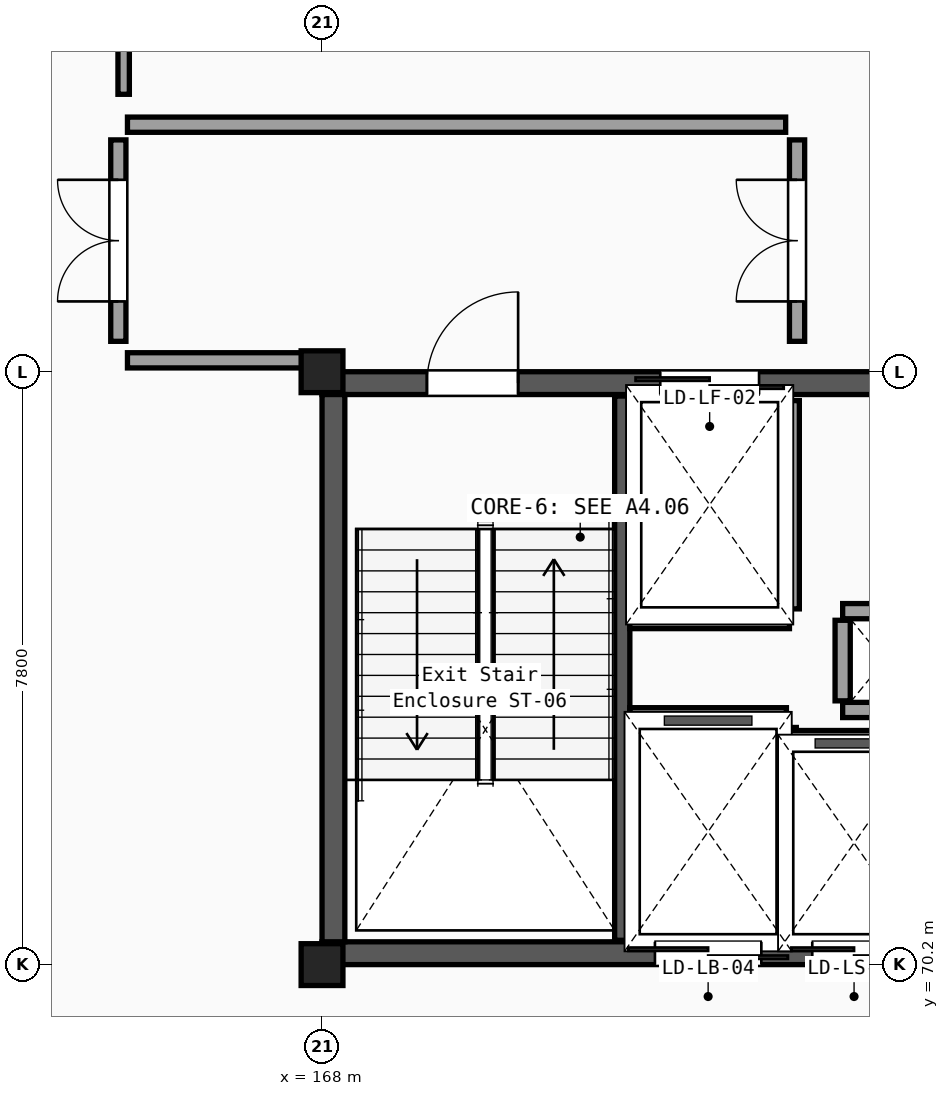
"""IFC4 building model, lengths in metres.
Left out: names, types, materials, properties, quantities, classifications, styles, units other than length and angle.
Written with IfcOpenShell. Run it as: python <this file> out.ifc"""

import sys

from ifc_helpers import new_model, si_unit, direction, frame, frame_2d, origin, origin_2d, place, context, subcontext, project, spatial, rectangle, i_section, extrude, element, fill, save


model = new_model("IFC4")
c1 = context("Model", 3, precision=1e-05, world=origin(), true_north=direction((0.0, 1.0)))
c2 = subcontext(c1, "Body", "Model", "MODEL_VIEW")
j1 = project(units=[si_unit("LENGTHUNIT", "METRE"), si_unit("PLANEANGLEUNIT", "RADIAN")], contexts=[c1])
p1 = place(None, origin())
s1 = spatial("IfcSite", under=j1, at=p1, CompositionType="ELEMENT")
p2 = place(p1, origin())
s2 = spatial("IfcBuilding", under=s1, at=p2, CompositionType="ELEMENT")
p3 = place(p2, frame((0.0, 0.0, 10.2)))
s3 = spatial("IfcBuildingStorey", under=s2, at=p3, CompositionType="ELEMENT", Elevation=10.2)
for number, where, z_axis, x_axis in (
    (1, (168.0, 70.2, 0.0), (0.0, 0.0, 1.0), (1.0, 0.0, 0.0)),
    (2, (168.0, 78.0, 0.0), (0.0, 0.0, 1.0), (1.0, 0.0, 0.0)),
):
    element("IfcColumn", number, at=place(p3, frame(where, z_axis=z_axis, x_axis=x_axis)), inside=s3, PredefinedType="COLUMN", context=c2, shape_type="SweptSolid", body=[
        extrude(i_section(OverallWidth=0.3, OverallDepth=0.55, WebThickness=0.015, FlangeThickness=0.029, FilletRadius=0.027, at=origin_2d()), origin(), (0.0, 0.0, 1.0), 4.65),
    ])
p4 = place(p3, frame((168.0, 70.35, 0.0), z_axis=(0.0, 0.0, 1.0), x_axis=(1.0, 0.0, 0.0)))
e3 = element("IfcWall", 3, at=p4, inside=s3, PredefinedType="SHEAR", context=c2, shape_type="SweptSolid", body=[
    extrude(rectangle(XDim=8.4, YDim=0.3, at=frame_2d((4.2, 0.0))), origin(), (0.0, 0.0, 1.0), 4.41),
])
p5 = place(p4, frame((4.38, 0.0, 0.0)))
e4 = element("IfcOpeningElement", 4, at=p5, cuts=e3, PredefinedType="OPENING", context=c2, shape_type="SweptSolid", body=[
    extrude(rectangle(XDim=1.4, YDim=2.2, at=frame_2d((0.7, 1.1))), frame((0.0, 0.16, 0.0), z_axis=(0.0, -1.0, 0.0), x_axis=(1.0, 0.0, 0.0)), (0.0, 0.0, 1.0), 0.32),
])
p6 = place(p4, frame((6.45, 0.0, 0.0)))
e5 = element("IfcOpeningElement", 5, at=p6, cuts=e3, PredefinedType="OPENING", context=c2, shape_type="SweptSolid", body=[
    extrude(rectangle(XDim=1.1, YDim=2.15, at=frame_2d((0.55, 1.075))), frame((0.0, 0.16, 0.0), z_axis=(0.0, -1.0, 0.0), x_axis=(1.0, 0.0, 0.0)), (0.0, 0.0, 1.0), 0.32),
])
p7 = place(p3, frame((168.0, 77.85, 0.0), z_axis=(0.0, 0.0, 1.0), x_axis=(1.0, 0.0, 0.0)))
e6 = element("IfcWall", 6, at=p7, inside=s3, PredefinedType="SHEAR", context=c2, shape_type="SweptSolid", body=[
    extrude(rectangle(XDim=8.4, YDim=0.3, at=frame_2d((4.2, 0.0))), origin(), (0.0, 0.0, 1.0), 4.41),
])
p8 = place(p7, frame((1.38, 0.0, 0.0)))
e7 = element("IfcOpeningElement", 7, at=p8, cuts=e6, PredefinedType="OPENING", context=c2, shape_type="SweptSolid", body=[
    extrude(rectangle(XDim=1.2, YDim=2.15, at=frame_2d((0.6, 1.075))), frame((0.0, 0.16, 0.0), z_axis=(0.0, -1.0, 0.0), x_axis=(1.0, 0.0, 0.0)), (0.0, 0.0, 1.0), 0.32),
])
p9 = place(p7, frame((4.45, 0.0, 0.0)))
e8 = element("IfcOpeningElement", 8, at=p9, cuts=e6, PredefinedType="OPENING", context=c2, shape_type="SweptSolid", body=[
    extrude(rectangle(XDim=1.3, YDim=2.2, at=frame_2d((0.65, 1.1))), frame((0.0, 0.16, 0.0), z_axis=(0.0, -1.0, 0.0), x_axis=(1.0, 0.0, 0.0)), (0.0, 0.0, 1.0), 0.32),
])
p10 = place(p3, frame((168.15, 70.5, 0.0), z_axis=(0.0, 0.0, 1.0), x_axis=(0.0, 1.0, 0.0)))
e9 = element("IfcWall", 9, at=p10, inside=s3, PredefinedType="SHEAR", context=c2, shape_type="SweptSolid", body=[
    extrude(rectangle(XDim=7.2, YDim=0.3, at=frame_2d((3.6, 0.0))), origin(), (0.0, 0.0, 1.0), 4.41),
])
p11 = place(p3, frame((171.95, 70.52, 0.0), z_axis=(0.0, 0.0, 1.0), x_axis=(0.0, 1.0, 0.0)))
e10 = element("IfcWall", 10, at=p11, inside=s3, PredefinedType="SHEAR", context=c2, shape_type="SweptSolid", body=[
    extrude(rectangle(XDim=7.16, YDim=0.2, at=frame_2d((3.58, 0.0))), origin(), (0.0, 0.0, 1.0), 4.41),
])
for number, where, z_axis, x_axis in (
    (11, (174.85, 73.55, 0.0), (0.0, 0.0, 1.0), (1.0, 0.0, 0.0)),
    (12, (174.85, 74.85, 0.0), (0.0, 0.0, 1.0), (1.0, 0.0, 0.0)),
):
    element("IfcWall", number, at=place(p3, frame(where, z_axis=z_axis, x_axis=x_axis)), inside=s3, PredefinedType="PARTITIONING", context=c2, shape_type="SweptSolid", body=[
        extrude(rectangle(XDim=1.1, YDim=0.2, at=frame_2d((0.55, 0.0))), origin(), (0.0, 0.0, 1.0), 3.95),
    ])
p12 = place(p3, frame((174.85, 73.67, 0.0), z_axis=(0.0, 0.0, 1.0), x_axis=(0.0, 1.0, 0.0)))
e13 = element("IfcWall", 13, at=p12, inside=s3, PredefinedType="PARTITIONING", context=c2, shape_type="SweptSolid", body=[
    extrude(rectangle(XDim=1.06, YDim=0.2, at=frame_2d((0.53, 0.0))), origin(), (0.0, 0.0, 1.0), 3.95),
])
p13 = place(p3, frame((174.18, 74.88, 0.0), z_axis=(0.0, 0.0, 1.0), x_axis=(0.0, 1.0, 0.0)))
e14 = element("IfcWall", 14, at=p13, inside=s3, PredefinedType="PARTITIONING", context=c2, shape_type="SweptSolid", body=[
    extrude(rectangle(XDim=2.74, YDim=0.2, at=frame_2d((1.37, 0.0))), origin(), (0.0, 0.0, 1.0), 3.95),
])
p14 = place(p3, frame((172.05, 74.72, 0.0), z_axis=(0.0, 0.0, 1.0), x_axis=(1.0, 0.0, 0.0)))
e15 = element("IfcWall", 15, at=p14, inside=s3, PredefinedType="PARTITIONING", context=c2, shape_type="SweptSolid", body=[
    extrude(rectangle(XDim=2.1, YDim=0.2, at=frame_2d((1.05, 0.0))), origin(), (0.0, 0.0, 1.0), 3.95),
])
p15 = place(p3, frame((174.14, 70.58, 0.0), z_axis=(0.0, 0.0, 1.0), x_axis=(0.0, 1.0, 0.0)))
e16 = element("IfcWall", 16, at=p15, inside=s3, PredefinedType="PARTITIONING", context=c2, shape_type="SweptSolid", body=[
    extrude(rectangle(XDim=2.74, YDim=0.2, at=frame_2d((1.37, 0.0))), origin(), (0.0, 0.0, 1.0), 3.95),
])
p16 = place(p3, frame((172.05, 73.48, 0.0), z_axis=(0.0, 0.0, 1.0), x_axis=(1.0, 0.0, 0.0)))
e17 = element("IfcWall", 17, at=p16, inside=s3, PredefinedType="PARTITIONING", context=c2, shape_type="SweptSolid", body=[
    extrude(rectangle(XDim=2.06, YDim=0.2, at=frame_2d((1.03, 0.0))), origin(), (0.0, 0.0, 1.0), 3.95),
])
p17 = place(p3, frame((174.07, 73.18, 0.0), z_axis=(0.0, 0.0, 1.0), x_axis=(1.0, 0.0, 0.0)))
e18 = element("IfcWall", 18, at=p17, inside=s3, PredefinedType="PARTITIONING", context=c2, shape_type="SweptSolid", body=[
    extrude(rectangle(XDim=1.86, YDim=0.2, at=frame_2d((0.93, 0.0))), origin(), (0.0, 0.0, 1.0), 3.95),
])
p18 = place(p3, frame((165.44, 78.15, 0.0), z_axis=(0.0, 0.0, 1.0), x_axis=(1.0, 0.0, 0.0)))
e19 = element("IfcWall", 19, at=p18, inside=s3, PredefinedType="PARTITIONING", context=c2, shape_type="SweptSolid", body=[
    extrude(rectangle(XDim=2.44, YDim=0.2, at=frame_2d((1.22, 0.0))), origin(), (0.0, 0.0, 1.0), 3.95),
])
p19 = place(p3, frame((165.44, 81.25, 0.0), z_axis=(0.0, 0.0, 1.0), x_axis=(1.0, 0.0, 0.0)))
e20 = element("IfcWall", 20, at=p19, inside=s3, PredefinedType="PARTITIONING", context=c2, shape_type="SweptSolid", body=[
    extrude(rectangle(XDim=8.66, YDim=0.2, at=frame_2d((4.33, 0.0))), origin(), (0.0, 0.0, 1.0), 3.95),
])
p20 = place(p3, frame((165.32, 78.4, 0.0), z_axis=(0.0, 0.0, 1.0), x_axis=(0.0, 1.0, 0.0)))
e21 = element("IfcWall", 21, at=p20, inside=s3, PredefinedType="PARTITIONING", context=c2, shape_type="SweptSolid", body=[
    extrude(rectangle(XDim=2.65, YDim=0.2, at=frame_2d((1.325, 0.0))), origin(), (0.0, 0.0, 1.0), 3.95),
])
p21 = place(p20, frame((0.525, 0.0, 0.0)))
e22 = element("IfcOpeningElement", 22, at=p21, cuts=e21, PredefinedType="OPENING", context=c2, shape_type="SweptSolid", body=[
    extrude(rectangle(XDim=1.6, YDim=2.2, at=frame_2d((0.8, 1.1))), frame((0.0, 0.11, 0.0), z_axis=(0.0, -1.0, 0.0), x_axis=(1.0, 0.0, 0.0)), (0.0, 0.0, 1.0), 0.22),
])
p22 = place(p3, frame((174.25, 78.4, 0.0), z_axis=(0.0, 0.0, 1.0), x_axis=(0.0, 1.0, 0.0)))
e23 = element("IfcWall", 23, at=p22, inside=s3, PredefinedType="PARTITIONING", context=c2, shape_type="SweptSolid", body=[
    extrude(rectangle(XDim=2.65, YDim=0.2, at=frame_2d((1.325, 0.0))), origin(), (0.0, 0.0, 1.0), 3.95),
])
p23 = place(p22, frame((0.525, 0.0, 0.0)))
e24 = element("IfcOpeningElement", 24, at=p23, cuts=e23, PredefinedType="OPENING", context=c2, shape_type="SweptSolid", body=[
    extrude(rectangle(XDim=1.6, YDim=2.2, at=frame_2d((0.8, 1.1))), frame((0.0, 0.11, 0.0), z_axis=(0.0, -1.0, 0.0), x_axis=(1.0, 0.0, 0.0)), (0.0, 0.0, 1.0), 0.22),
])
p24 = place(p3, frame((165.39, 81.65, 0.0), z_axis=(0.0, 0.0, 1.0), x_axis=(0.0, 1.0, 0.0)))
e25 = element("IfcWall", 25, at=p24, inside=s3, PredefinedType="PARTITIONING", context=c2, shape_type="SweptSolid", body=[
    extrude(rectangle(XDim=10.433, YDim=0.15, at=frame_2d((5.216, 0.0))), origin(), (0.0, 0.0, 1.0), 4.05),
])
p25 = place(p24, frame((4.691, 0.0, 0.0)))
e26 = element("IfcOpeningElement", 26, at=p25, cuts=e25, PredefinedType="OPENING", context=c2, shape_type="SweptSolid", body=[
    extrude(rectangle(XDim=1.05, YDim=2.15, at=frame_2d((0.525, 1.075))), frame((0.0, 0.085, 0.0), z_axis=(0.0, -1.0, 0.0), x_axis=(1.0, 0.0, 0.0)), (0.0, 0.0, 1.0), 0.17),
])
p26 = place(p8, origin())
e27 = element("IfcDoor", 27, at=p26, inside=s3, OperationType="SINGLE_SWING_RIGHT", PredefinedType="DOOR", context=c2, shape_type="SweptSolid", body=[
    extrude(rectangle(XDim=1.2, YDim=2.15, at=frame_2d((0.6, 1.075))), frame((0.0, 0.025, 0.0), z_axis=(0.0, -1.0, 0.0), x_axis=(1.0, 0.0, 0.0)), (0.0, 0.0, 1.0), 0.05),
])
fill(e7, e27)
p27 = place(p9, origin())
e28 = element("IfcDoor", 28, at=p27, inside=s3, OperationType="DOUBLE_DOOR_SLIDING", PredefinedType="DOOR", context=c2, shape_type="SweptSolid", body=[
    extrude(rectangle(XDim=1.3, YDim=2.2, at=frame_2d((0.65, 1.1))), frame((0.0, 0.025, 0.0), z_axis=(0.0, -1.0, 0.0), x_axis=(1.0, 0.0, 0.0)), (0.0, 0.0, 1.0), 0.05),
])
fill(e8, e28)
p28 = place(p5, origin())
e29 = element("IfcDoor", 29, at=p28, inside=s3, OperationType="DOUBLE_DOOR_SLIDING", PredefinedType="DOOR", context=c2, shape_type="SweptSolid", body=[
    extrude(rectangle(XDim=1.4, YDim=2.2, at=frame_2d((0.7, 1.1))), frame((0.0, 0.025, 0.0), z_axis=(0.0, -1.0, 0.0), x_axis=(1.0, 0.0, 0.0)), (0.0, 0.0, 1.0), 0.05),
])
fill(e4, e29)
p29 = place(p6, origin())
e30 = element("IfcDoor", 30, at=p29, inside=s3, OperationType="DOUBLE_DOOR_SLIDING", PredefinedType="DOOR", context=c2, shape_type="SweptSolid", body=[
    extrude(rectangle(XDim=1.1, YDim=2.15, at=frame_2d((0.55, 1.075))), frame((0.0, 0.025, 0.0), z_axis=(0.0, -1.0, 0.0), x_axis=(1.0, 0.0, 0.0)), (0.0, 0.0, 1.0), 0.05),
])
fill(e5, e30)
p30 = place(p21, origin())
e31 = element("IfcDoor", 31, at=p30, inside=s3, OperationType="DOUBLE_DOOR_SINGLE_SWING", PredefinedType="DOOR", context=c2, shape_type="SweptSolid", body=[
    extrude(rectangle(XDim=1.6, YDim=2.2, at=frame_2d((0.8, 1.1))), frame((0.0, 0.025, 0.0), z_axis=(0.0, -1.0, 0.0), x_axis=(1.0, 0.0, 0.0)), (0.0, 0.0, 1.0), 0.05),
])
fill(e22, e31)
p31 = place(p23, origin())
e32 = element("IfcDoor", 32, at=p31, inside=s3, OperationType="DOUBLE_DOOR_SINGLE_SWING", PredefinedType="DOOR", context=c2, shape_type="SweptSolid", body=[
    extrude(rectangle(XDim=1.6, YDim=2.2, at=frame_2d((0.8, 1.1))), frame((0.0, 0.025, 0.0), z_axis=(0.0, -1.0, 0.0), x_axis=(1.0, 0.0, 0.0)), (0.0, 0.0, 1.0), 0.05),
])
fill(e24, e32)
save(model, sys.argv[1])
